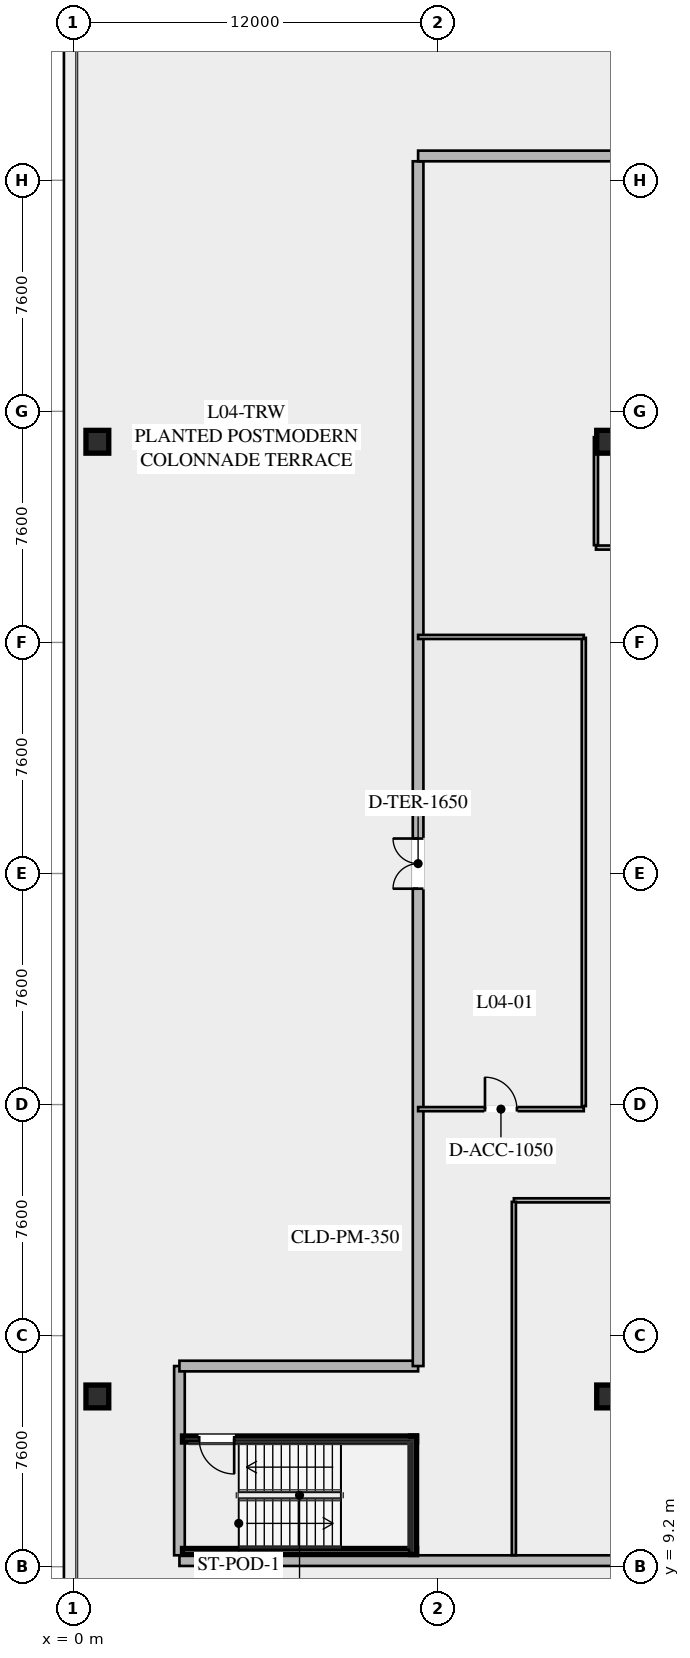
"""IFC4 building model, lengths in metres.
Left out: names, types, materials, properties, quantities, classifications, styles, units other than length and angle.
Written with IfcOpenShell. Run it as: python <this file> out.ifc"""

import sys

from ifc_helpers import new_model, si_unit, direction, frame, frame_2d, origin, origin_2d, place, context, subcontext, project, spatial, rectangle, extrude, element, fill, save


model = new_model("IFC4")
c1 = context("Model", 3, precision=1e-05, world=origin(), true_north=direction((0.0, 1.0)))
c2 = subcontext(c1, "Body", "Model", "MODEL_VIEW")
j1 = project(units=[si_unit("LENGTHUNIT", "METRE"), si_unit("PLANEANGLEUNIT", "RADIAN")], contexts=[c1])
p1 = place(None, origin())
s1 = spatial("IfcSite", under=j1, at=p1, CompositionType="ELEMENT")
p2 = place(p1, origin())
s2 = spatial("IfcBuilding", under=s1, at=p2, CompositionType="ELEMENT")
p3 = place(p2, frame((0.0, 0.0, 19.8)))
s3 = spatial("IfcBuildingStorey", under=s2, at=p3, CompositionType="ELEMENT", Elevation=19.8)
for number, where, z_axis, x_axis in (
    (1, (0.8, 14.8, 0.0), (0.0, 0.0, 1.0), (1.0, 0.0, 0.0)),
    (2, (0.8, 46.2, 0.0), (0.0, 0.0, 1.0), (1.0, 0.0, 0.0)),
    (3, (17.6, 14.8, 0.0), (0.0, 0.0, 1.0), (1.0, 0.0, 0.0)),
    (4, (17.6, 46.2, 0.0), (0.0, 0.0, 1.0), (1.0, 0.0, 0.0)),
):
    element("IfcColumn", number, at=place(p3, frame(where, z_axis=z_axis, x_axis=x_axis)), inside=s3, PredefinedType="COLUMN", context=c2, shape_type="SweptSolid", body=[
        extrude(rectangle(XDim=0.75, YDim=0.75, at=origin_2d()), origin(), (0.0, 0.0, 1.0), 4.6),
    ])
p4 = place(p3, frame((143.825, 9.4, 0.0), z_axis=(0.0, 0.0, 1.0), x_axis=(-1.0, 0.0, 0.0)))
e5 = element("IfcWall", 5, at=p4, inside=s3, PredefinedType="SOLIDWALL", context=c2, shape_type="SweptSolid", body=[
    extrude(rectangle(XDim=140.325, YDim=0.35, at=frame_2d((70.163, 0.0))), origin(), (0.0, 0.0, 1.0), 4.6),
])
p5 = place(p4, frame((115.725, 0.0, 0.95)))
e6 = element("IfcOpeningElement", 6, at=p5, cuts=e5, PredefinedType="OPENING", context=c2, shape_type="SweptSolid", body=[
    extrude(rectangle(XDim=3.6, YDim=1.8, at=frame_2d((1.8, 0.9))), frame((0.0, 0.185, 0.0), z_axis=(0.0, -1.0, 0.0), x_axis=(1.0, 0.0, 0.0)), (0.0, 0.0, 1.0), 0.37),
])
p6 = place(p4, frame((70.025, 0.0, 0.95)))
e7 = element("IfcOpeningElement", 7, at=p6, cuts=e5, PredefinedType="OPENING", context=c2, shape_type="SweptSolid", body=[
    extrude(rectangle(XDim=3.6, YDim=1.8, at=frame_2d((1.8, 0.9))), frame((0.0, 0.185, 0.0), z_axis=(0.0, -1.0, 0.0), x_axis=(1.0, 0.0, 0.0)), (0.0, 0.0, 1.0), 0.37),
])
p7 = place(p4, frame((60.425, 0.0, 0.95)))
e8 = element("IfcOpeningElement", 8, at=p7, cuts=e5, PredefinedType="OPENING", context=c2, shape_type="SweptSolid", body=[
    extrude(rectangle(XDim=3.6, YDim=1.8, at=frame_2d((1.8, 0.9))), frame((0.0, 0.185, 0.0), z_axis=(0.0, -1.0, 0.0), x_axis=(1.0, 0.0, 0.0)), (0.0, 0.0, 1.0), 0.37),
])
p8 = place(p3, frame((3.5, 9.575, 0.0), z_axis=(0.0, 0.0, 1.0), x_axis=(0.0, 1.0, 0.0)))
e9 = element("IfcWall", 9, at=p8, inside=s3, PredefinedType="SOLIDWALL", context=c2, shape_type="SweptSolid", body=[
    extrude(rectangle(XDim=6.225, YDim=0.35, at=frame_2d((3.113, 0.0))), origin(), (0.0, 0.0, 1.0), 4.6),
])
p9 = place(p3, frame((3.5, 15.8, 0.0), z_axis=(0.0, 0.0, 1.0), x_axis=(1.0, 0.0, 0.0)))
e10 = element("IfcWall", 10, at=p9, inside=s3, PredefinedType="SOLIDWALL", context=c2, shape_type="SweptSolid", body=[
    extrude(rectangle(XDim=7.85, YDim=0.35, at=frame_2d((3.925, 0.0))), origin(), (0.0, 0.0, 1.0), 4.6),
])
p10 = place(p3, frame((11.35, 15.8, 0.0), z_axis=(0.0, 0.0, 1.0), x_axis=(0.0, 1.0, 0.0)))
e11 = element("IfcWall", 11, at=p10, inside=s3, PredefinedType="SOLIDWALL", context=c2, shape_type="SweptSolid", body=[
    extrude(rectangle(XDim=39.625, YDim=0.35, at=frame_2d((19.812, 0.0))), origin(), (0.0, 0.0, 1.0), 4.6),
])
p11 = place(p10, frame((15.7, 0.0, 0.0)))
e12 = element("IfcOpeningElement", 12, at=p11, cuts=e11, PredefinedType="OPENING", context=c2, shape_type="SweptSolid", body=[
    extrude(rectangle(XDim=1.65, YDim=2.2, at=frame_2d((0.825, 1.1))), frame((0.0, 0.185, 0.0), z_axis=(0.0, -1.0, 0.0), x_axis=(1.0, 0.0, 0.0)), (0.0, 0.0, 1.0), 0.37),
])
p12 = place(p3, frame((11.35, 55.6, 0.0), z_axis=(0.0, 0.0, 1.0), x_axis=(1.0, 0.0, 0.0)))
e13 = element("IfcWall", 13, at=p12, inside=s3, PredefinedType="SOLIDWALL", context=c2, shape_type="SweptSolid", body=[
    extrude(rectangle(XDim=132.475, YDim=0.35, at=frame_2d((66.237, 0.0))), origin(), (0.0, 0.0, 1.0), 4.6),
])
p13 = place(p12, frame((13.15, 0.0, 0.95)))
e14 = element("IfcOpeningElement", 14, at=p13, cuts=e13, PredefinedType="OPENING", context=c2, shape_type="SweptSolid", body=[
    extrude(rectangle(XDim=3.6, YDim=1.8, at=frame_2d((1.8, 0.9))), frame((0.0, 0.185, 0.0), z_axis=(0.0, -1.0, 0.0), x_axis=(1.0, 0.0, 0.0)), (0.0, 0.0, 1.0), 0.37),
])
p14 = place(p12, frame((58.85, 0.0, 0.95)))
e15 = element("IfcOpeningElement", 15, at=p14, cuts=e13, PredefinedType="OPENING", context=c2, shape_type="SweptSolid", body=[
    extrude(rectangle(XDim=3.6, YDim=1.8, at=frame_2d((1.8, 0.9))), frame((0.0, 0.185, 0.0), z_axis=(0.0, -1.0, 0.0), x_axis=(1.0, 0.0, 0.0)), (0.0, 0.0, 1.0), 0.37),
])
p15 = place(p12, frame((68.45, 0.0, 0.95)))
e16 = element("IfcOpeningElement", 16, at=p15, cuts=e13, PredefinedType="OPENING", context=c2, shape_type="SweptSolid", body=[
    extrude(rectangle(XDim=3.6, YDim=1.8, at=frame_2d((1.8, 0.9))), frame((0.0, 0.185, 0.0), z_axis=(0.0, -1.0, 0.0), x_axis=(1.0, 0.0, 0.0)), (0.0, 0.0, 1.0), 0.37),
])
p16 = place(p3, frame((11.3, 13.4, 0.0), z_axis=(0.0, 0.0, 1.0), x_axis=(-1.0, 0.0, 0.0)))
e17 = element("IfcWall", 17, at=p16, inside=s3, PredefinedType="SHEAR", context=c2, shape_type="SweptSolid", body=[
    extrude(rectangle(XDim=7.7, YDim=0.2, at=frame_2d((3.85, 0.0))), origin(), (0.0, 0.0, 1.0), 4.6),
])
p17 = place(p16, frame((6.0, 0.0, 0.0)))
e18 = element("IfcOpeningElement", 18, at=p17, cuts=e17, PredefinedType="OPENING", context=c2, shape_type="SweptSolid", body=[
    extrude(rectangle(XDim=1.15, YDim=2.2, at=frame_2d((0.575, 1.1))), frame((0.0, 0.11, 0.0), z_axis=(0.0, -1.0, 0.0), x_axis=(1.0, 0.0, 0.0)), (0.0, 0.0, 1.0), 0.22),
])
p18 = place(p3, frame((3.6, 9.7, 0.0), z_axis=(0.0, 0.0, 1.0), x_axis=(1.0, 0.0, 0.0)))
e19 = element("IfcWall", 19, at=p18, inside=s3, PredefinedType="SHEAR", context=c2, shape_type="SweptSolid", body=[
    extrude(rectangle(XDim=7.7, YDim=0.2, at=frame_2d((3.85, 0.0))), origin(), (0.0, 0.0, 1.0), 4.6),
])
p19 = place(p3, frame((11.2, 9.6, 0.0), z_axis=(0.0, 0.0, 1.0), x_axis=(0.0, 1.0, 0.0)))
e20 = element("IfcWall", 20, at=p19, inside=s3, PredefinedType="SHEAR", context=c2, shape_type="SweptSolid", body=[
    extrude(rectangle(XDim=3.9, YDim=0.2, at=frame_2d((1.95, 0.0))), origin(), (0.0, 0.0, 1.0), 4.6),
])
p20 = place(p3, frame((11.35, 24.25, 0.0), z_axis=(0.0, 0.0, 1.0), x_axis=(1.0, 0.0, 0.0)))
e21 = element("IfcWall", 21, at=p20, inside=s3, PredefinedType="PARTITIONING", context=c2, shape_type="SweptSolid", body=[
    extrude(rectangle(XDim=5.45, YDim=0.135, at=frame_2d((2.725, 0.0))), origin(), (0.0, 0.0, 1.0), 3.643),
])
p21 = place(p20, frame((2.2, 0.0, 0.0)))
e22 = element("IfcOpeningElement", 22, at=p21, cuts=e21, PredefinedType="OPENING", context=c2, shape_type="SweptSolid", body=[
    extrude(rectangle(XDim=1.05, YDim=2.2, at=frame_2d((0.525, 1.1))), frame((0.0, 0.077, 0.0), z_axis=(0.0, -1.0, 0.0), x_axis=(1.0, 0.0, 0.0)), (0.0, 0.0, 1.0), 0.155),
])
p22 = place(p3, frame((16.8, 24.35, 0.0), z_axis=(0.0, 0.0, 1.0), x_axis=(0.0, 1.0, 0.0)))
e23 = element("IfcWall", 23, at=p22, inside=s3, PredefinedType="PARTITIONING", context=c2, shape_type="SweptSolid", body=[
    extrude(rectangle(XDim=15.4, YDim=0.135, at=frame_2d((7.7, 0.0))), origin(), (0.0, 0.0, 1.0), 3.643),
])
p23 = place(p3, frame((11.35, 39.78, 0.0), z_axis=(0.0, 0.0, 1.0), x_axis=(1.0, 0.0, 0.0)))
e24 = element("IfcWall", 24, at=p23, inside=s3, PredefinedType="PARTITIONING", context=c2, shape_type="SweptSolid", body=[
    extrude(rectangle(XDim=5.45, YDim=0.135, at=frame_2d((2.725, 0.0))), origin(), (0.0, 0.0, 1.0), 3.643),
])
p24 = place(p3, frame((14.5, 21.25, 0.0), z_axis=(0.0, 0.0, 1.0), x_axis=(1.0, 0.0, 0.0)))
e25 = element("IfcWall", 25, at=p24, inside=s3, PredefinedType="PARTITIONING", context=c2, shape_type="SweptSolid", body=[
    extrude(rectangle(XDim=49.65, YDim=0.135, at=frame_2d((24.825, 0.0))), origin(), (0.0, 0.0, 1.0), 3.643),
])
p25 = place(p24, frame((12.0, 0.0, 0.0)))
e26 = element("IfcOpeningElement", 26, at=p25, cuts=e25, PredefinedType="OPENING", context=c2, shape_type="SweptSolid", body=[
    extrude(rectangle(XDim=1.05, YDim=2.2, at=frame_2d((0.525, 1.1))), frame((0.0, 0.077, 0.0), z_axis=(0.0, -1.0, 0.0), x_axis=(1.0, 0.0, 0.0)), (0.0, 0.0, 1.0), 0.155),
])
p26 = place(p3, frame((14.5, 9.58, 0.0), z_axis=(0.0, 0.0, 1.0), x_axis=(0.0, 1.0, 0.0)))
e27 = element("IfcWall", 27, at=p26, inside=s3, PredefinedType="PARTITIONING", context=c2, shape_type="SweptSolid", body=[
    extrude(rectangle(XDim=11.62, YDim=0.135, at=frame_2d((5.81, 0.0))), origin(), (0.0, 0.0, 1.0), 3.643),
])
p27 = place(p3, frame((17.2, 42.72, 0.0), z_axis=(0.0, 0.0, 1.0), x_axis=(1.0, 0.0, 0.0)))
e28 = element("IfcWall", 28, at=p27, inside=s3, PredefinedType="PARTITIONING", context=c2, shape_type="SweptSolid", body=[
    extrude(rectangle(XDim=4.1, YDim=0.135, at=frame_2d((2.05, 0.0))), origin(), (0.0, 0.0, 1.0), 3.643),
])
p28 = place(p27, frame((1.4, 0.0, 0.0)))
e29 = element("IfcOpeningElement", 29, at=p28, cuts=e28, PredefinedType="OPENING", context=c2, shape_type="SweptSolid", body=[
    extrude(rectangle(XDim=1.05, YDim=2.2, at=frame_2d((0.525, 1.1))), frame((0.0, 0.077, 0.0), z_axis=(0.0, -1.0, 0.0), x_axis=(1.0, 0.0, 0.0)), (0.0, 0.0, 1.0), 0.155),
])
p29 = place(p3, frame((17.2, 46.4, 0.0), z_axis=(0.0, 0.0, 1.0), x_axis=(1.0, 0.0, 0.0)))
e30 = element("IfcWall", 30, at=p29, inside=s3, PredefinedType="PARTITIONING", context=c2, shape_type="SweptSolid", body=[
    extrude(rectangle(XDim=4.1, YDim=0.135, at=frame_2d((2.05, 0.0))), origin(), (0.0, 0.0, 1.0), 3.643),
])
p30 = place(p3, frame((17.2, 42.8, 0.0), z_axis=(0.0, 0.0, 1.0), x_axis=(0.0, 1.0, 0.0)))
e31 = element("IfcWall", 31, at=p30, inside=s3, PredefinedType="PARTITIONING", context=c2, shape_type="SweptSolid", body=[
    extrude(rectangle(XDim=3.55, YDim=0.135, at=frame_2d((1.775, 0.0))), origin(), (0.0, 0.0, 1.0), 3.643),
])
p31 = place(p11, origin())
e32 = element("IfcDoor", 32, at=p31, inside=s3, OperationType="DOUBLE_DOOR_SINGLE_SWING", PredefinedType="DOOR", context=c2, shape_type="SweptSolid", body=[
    extrude(rectangle(XDim=1.65, YDim=2.2, at=frame_2d((0.825, 1.1))), frame((0.0, 0.025, 0.0), z_axis=(0.0, -1.0, 0.0), x_axis=(1.0, 0.0, 0.0)), (0.0, 0.0, 1.0), 0.05),
])
fill(e12, e32)
p32 = place(p17, origin())
e33 = element("IfcDoor", 33, at=p32, inside=s3, OperationType="SINGLE_SWING_LEFT", PredefinedType="DOOR", context=c2, shape_type="SweptSolid", body=[
    extrude(rectangle(XDim=1.15, YDim=2.2, at=frame_2d((0.575, 1.1))), frame((0.0, 0.025, 0.0), z_axis=(0.0, -1.0, 0.0), x_axis=(1.0, 0.0, 0.0)), (0.0, 0.0, 1.0), 0.05),
])
fill(e18, e33)
p33 = place(p21, origin())
e34 = element("IfcDoor", 34, at=p33, inside=s3, OperationType="SINGLE_SWING_LEFT", PredefinedType="DOOR", context=c2, shape_type="SweptSolid", body=[
    extrude(rectangle(XDim=1.05, YDim=2.2, at=frame_2d((0.525, 1.1))), frame((0.0, 0.025, 0.0), z_axis=(0.0, -1.0, 0.0), x_axis=(1.0, 0.0, 0.0)), (0.0, 0.0, 1.0), 0.05),
])
fill(e22, e34)
save(model, sys.argv[1])
